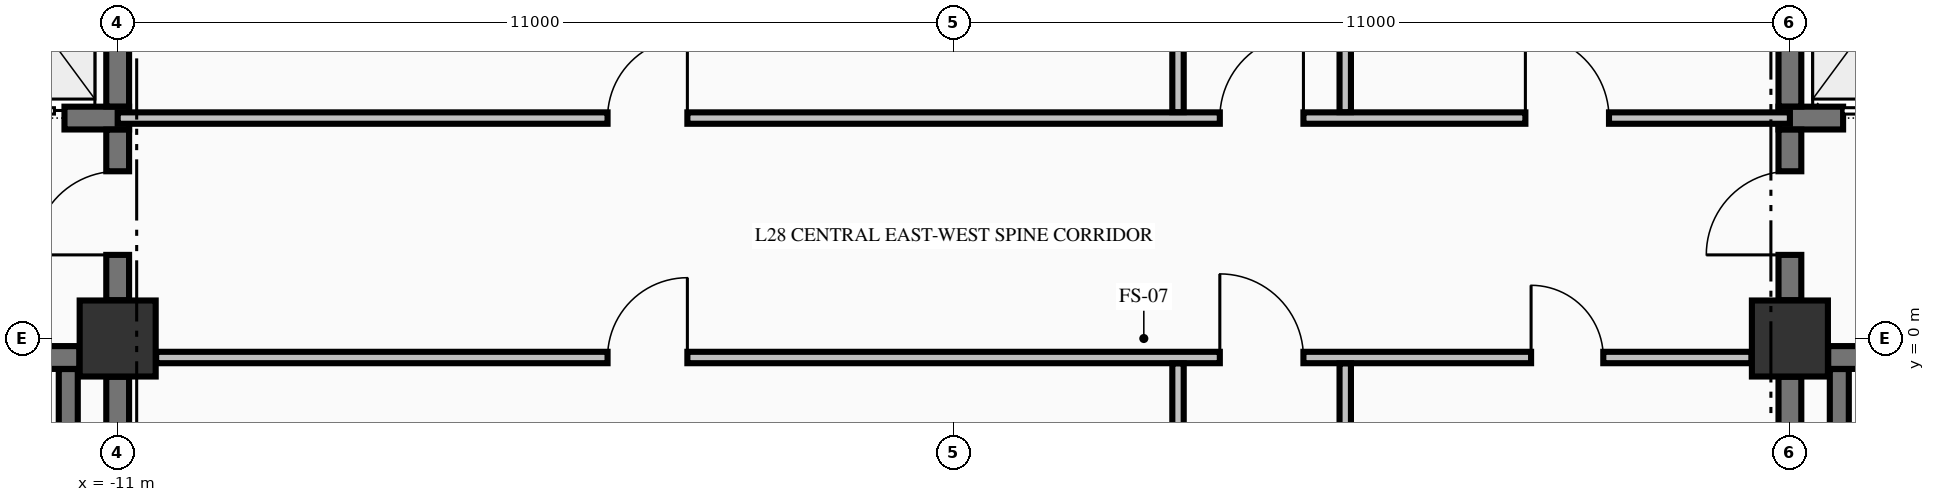
"""IFC4 building model, lengths in metres.
Left out: names, types, materials, properties, quantities, classifications, styles, units other than length and angle.
Written with IfcOpenShell. Run it as: python <this file> out.ifc"""

import sys

from ifc_helpers import new_model, si_unit, direction, frame, frame_2d, origin, origin_2d, place, context, subcontext, project, spatial, rectangle, extrude, element, fill, save


model = new_model("IFC4")
c1 = context("Model", 3, precision=1e-05, world=origin(), true_north=direction((0.0, 1.0)))
c2 = subcontext(c1, "Body", "Model", "MODEL_VIEW")
j1 = project(units=[si_unit("LENGTHUNIT", "METRE"), si_unit("PLANEANGLEUNIT", "RADIAN")], contexts=[c1])
p1 = place(None, origin())
s1 = spatial("IfcSite", under=j1, at=p1, CompositionType="ELEMENT")
p2 = place(p1, origin())
s2 = spatial("IfcBuilding", under=s1, at=p2, CompositionType="ELEMENT")
p3 = place(p2, frame((0.0, 0.0, 112.78)))
s3 = spatial("IfcBuildingStorey", under=s2, at=p3, CompositionType="ELEMENT", Elevation=112.78)
for number, where, z_axis, x_axis in (
    (1, (-11.0, 0.0, -0.25), (0.0, 0.0, 1.0), (1.0, 0.0, 0.0)),
    (2, (11.0, 0.0, -0.25), (0.0, 0.0, 1.0), (1.0, 0.0, 0.0)),
):
    element("IfcColumn", number, at=place(p3, frame(where, z_axis=z_axis, x_axis=x_axis)), inside=s3, PredefinedType="COLUMN", context=c2, shape_type="SweptSolid", body=[
        extrude(rectangle(XDim=1.0, YDim=1.0, at=origin_2d()), origin(), (0.0, 0.0, 1.0), 3.395),
    ])
p4 = place(p3, frame((-19.496, -0.25, 0.0), z_axis=(0.0, 0.0, 1.0), x_axis=(1.0, 0.0, 0.0)))
e3 = element("IfcWall", 3, at=p4, inside=s3, PredefinedType="SHEAR", context=c2, shape_type="SweptSolid", body=[
    extrude(rectangle(XDim=7.992, YDim=0.3, at=frame_2d((3.996, 0.0))), origin(), (0.0, 0.0, 1.0), 3.145),
])
p5 = place(p4, frame((5.796, 0.0, 0.0)))
e4 = element("IfcOpeningElement", 4, at=p5, cuts=e3, PredefinedType="OPENING", context=c2, shape_type="SweptSolid", body=[
    extrude(rectangle(XDim=1.1, YDim=2.15, at=frame_2d((0.55, 1.075))), frame((0.0, 0.16, 0.0), z_axis=(0.0, -1.0, 0.0), x_axis=(1.0, 0.0, 0.0)), (0.0, 0.0, 1.0), 0.32),
])
p6 = place(p3, frame((11.504, -0.25, 0.0), z_axis=(0.0, 0.0, 1.0), x_axis=(1.0, 0.0, 0.0)))
e5 = element("IfcWall", 5, at=p6, inside=s3, PredefinedType="SHEAR", context=c2, shape_type="SweptSolid", body=[
    extrude(rectangle(XDim=3.371, YDim=0.3, at=frame_2d((1.686, 0.0))), origin(), (0.0, 0.0, 1.0), 3.145),
])
p7 = place(p6, frame((1.096, 0.0, 0.0)))
e6 = element("IfcOpeningElement", 6, at=p7, cuts=e5, PredefinedType="OPENING", context=c2, shape_type="SweptSolid", body=[
    extrude(rectangle(XDim=1.1, YDim=2.15, at=frame_2d((0.55, 1.075))), frame((0.0, 0.16, 0.0), z_axis=(0.0, -1.0, 0.0), x_axis=(1.0, 0.0, 0.0)), (0.0, 0.0, 1.0), 0.32),
])
p8 = place(p3, frame((-14.875, 2.9, 0.0), z_axis=(0.0, 0.0, 1.0), x_axis=(1.0, 0.0, 0.0)))
e7 = element("IfcWall", 7, at=p8, inside=s3, PredefinedType="SHEAR", context=c2, shape_type="SweptSolid", body=[
    extrude(rectangle(XDim=4.025, YDim=0.3, at=frame_2d((2.012, 0.0))), origin(), (0.0, 0.0, 1.0), 3.145),
])
p9 = place(p8, frame((2.075, 0.0, 0.0)))
e8 = element("IfcOpeningElement", 8, at=p9, cuts=e7, PredefinedType="OPENING", context=c2, shape_type="SweptSolid", body=[
    extrude(rectangle(XDim=1.1, YDim=2.2, at=frame_2d((0.55, 1.1))), frame((0.0, 0.16, 0.0), z_axis=(0.0, -1.0, 0.0), x_axis=(1.0, 0.0, 0.0)), (0.0, 0.0, 1.0), 0.32),
])
p10 = place(p3, frame((10.85, 2.9, 0.0), z_axis=(0.0, 0.0, 1.0), x_axis=(1.0, 0.0, 0.0)))
e9 = element("IfcWall", 9, at=p10, inside=s3, PredefinedType="SHEAR", context=c2, shape_type="SweptSolid", body=[
    extrude(rectangle(XDim=4.025, YDim=0.3, at=frame_2d((2.012, 0.0))), origin(), (0.0, 0.0, 1.0), 3.145),
])
p11 = place(p10, frame((0.85, 0.0, 0.0)))
e10 = element("IfcOpeningElement", 10, at=p11, cuts=e9, PredefinedType="OPENING", context=c2, shape_type="SweptSolid", body=[
    extrude(rectangle(XDim=1.1, YDim=2.2, at=frame_2d((0.55, 1.1))), frame((0.0, 0.16, 0.0), z_axis=(0.0, -1.0, 0.0), x_axis=(1.0, 0.0, 0.0)), (0.0, 0.0, 1.0), 0.32),
])
p12 = place(p3, frame((-10.494, -0.25, 0.0), z_axis=(0.0, 0.0, 1.0), x_axis=(1.0, 0.0, 0.0)))
e11 = element("IfcWall", 11, at=p12, inside=s3, PredefinedType="PARTITIONING", context=c2, shape_type="SweptSolid", body=[
    extrude(rectangle(XDim=20.988, YDim=0.15, at=frame_2d((10.494, 0.0))), origin(), (0.0, 0.0, 1.0), 3.145),
])
p13 = place(p12, frame((13.994, 0.0, 0.0)))
e12 = element("IfcOpeningElement", 12, at=p13, cuts=e11, PredefinedType="OPENING", context=c2, shape_type="SweptSolid", body=[
    extrude(rectangle(XDim=1.1, YDim=2.15, at=frame_2d((0.55, 1.075))), frame((0.0, 0.085, 0.0), z_axis=(0.0, -1.0, 0.0), x_axis=(1.0, 0.0, 0.0)), (0.0, 0.0, 1.0), 0.17),
])
p14 = place(p12, frame((5.939, 0.0, 0.0)))
e13 = element("IfcOpeningElement", 13, at=p14, cuts=e11, PredefinedType="OPENING", context=c2, shape_type="SweptSolid", body=[
    extrude(rectangle(XDim=1.05, YDim=2.15, at=frame_2d((0.525, 1.075))), frame((0.0, 0.085, 0.0), z_axis=(0.0, -1.0, 0.0), x_axis=(1.0, 0.0, 0.0)), (0.0, 0.0, 1.0), 0.17),
])
p15 = place(p12, frame((18.089, 0.0, 0.0)))
e14 = element("IfcOpeningElement", 14, at=p15, cuts=e11, PredefinedType="OPENING", context=c2, shape_type="SweptSolid", body=[
    extrude(rectangle(XDim=0.95, YDim=2.15, at=frame_2d((0.475, 1.075))), frame((0.0, 0.085, 0.0), z_axis=(0.0, -1.0, 0.0), x_axis=(1.0, 0.0, 0.0)), (0.0, 0.0, 1.0), 0.17),
])
p16 = place(p3, frame((-11.0, 2.9, 0.0), z_axis=(0.0, 0.0, 1.0), x_axis=(1.0, 0.0, 0.0)))
e15 = element("IfcWall", 15, at=p16, inside=s3, PredefinedType="PARTITIONING", context=c2, shape_type="SweptSolid", body=[
    extrude(rectangle(XDim=22.0, YDim=0.15, at=frame_2d((11.0, 0.0))), origin(), (0.0, 0.0, 1.0), 3.145),
])
p17 = place(p16, frame((14.5, 0.0, 0.0)))
e16 = element("IfcOpeningElement", 16, at=p17, cuts=e15, PredefinedType="OPENING", context=c2, shape_type="SweptSolid", body=[
    extrude(rectangle(XDim=1.1, YDim=2.15, at=frame_2d((0.55, 1.075))), frame((0.0, 0.085, 0.0), z_axis=(0.0, -1.0, 0.0), x_axis=(1.0, 0.0, 0.0)), (0.0, 0.0, 1.0), 0.17),
])
p18 = place(p16, frame((6.445, 0.0, 0.0)))
e17 = element("IfcOpeningElement", 17, at=p18, cuts=e15, PredefinedType="OPENING", context=c2, shape_type="SweptSolid", body=[
    extrude(rectangle(XDim=1.05, YDim=2.15, at=frame_2d((0.525, 1.075))), frame((0.0, 0.085, 0.0), z_axis=(0.0, -1.0, 0.0), x_axis=(1.0, 0.0, 0.0)), (0.0, 0.0, 1.0), 0.17),
])
p19 = place(p16, frame((18.52, 0.0, 0.0)))
e18 = element("IfcOpeningElement", 18, at=p19, cuts=e15, PredefinedType="OPENING", context=c2, shape_type="SweptSolid", body=[
    extrude(rectangle(XDim=1.1, YDim=2.15, at=frame_2d((0.55, 1.075))), frame((0.0, 0.085, 0.0), z_axis=(0.0, -1.0, 0.0), x_axis=(1.0, 0.0, 0.0)), (0.0, 0.0, 1.0), 0.17),
])
p20 = place(p3, frame((-11.65, -9.798, 0.0), z_axis=(0.0, 0.0, 1.0), x_axis=(0.0, 1.0, 0.0)))
e19 = element("IfcWall", 19, at=p20, inside=s3, PredefinedType="SOLIDWALL", context=c2, shape_type="SweptSolid", body=[
    extrude(rectangle(XDim=9.396, YDim=0.25, at=frame_2d((4.698, 0.0))), origin(), (0.0, 0.0, 1.0), 3.145),
])
p21 = place(p3, frame((-11.0, -9.446, 0.0), z_axis=(0.0, 0.0, 1.0), x_axis=(0.0, 1.0, 0.0)))
e20 = element("IfcWall", 20, at=p21, inside=s3, PredefinedType="SHEAR", context=c2, shape_type="SweptSolid", body=[
    extrude(rectangle(XDim=8.942, YDim=0.3, at=frame_2d((4.471, 0.0))), origin(), (0.0, 0.0, 1.0), 3.145),
])
p22 = place(p3, frame((-11.0, 0.504, 0.0), z_axis=(0.0, 0.0, 1.0), x_axis=(0.0, 1.0, 0.0)))
e21 = element("IfcWall", 21, at=p22, inside=s3, PredefinedType="SHEAR", context=c2, shape_type="SweptSolid", body=[
    extrude(rectangle(XDim=2.244, YDim=0.3, at=frame_2d((1.122, 0.0))), origin(), (0.0, 0.0, 1.0), 3.145),
])
p23 = place(p22, frame((0.596, 0.0, 0.0)))
e22 = element("IfcOpeningElement", 22, at=p23, cuts=e21, PredefinedType="OPENING", context=c2, shape_type="SweptSolid", body=[
    extrude(rectangle(XDim=1.1, YDim=2.15, at=frame_2d((0.55, 1.075))), frame((0.0, 0.16, 0.0), z_axis=(0.0, -1.0, 0.0), x_axis=(1.0, 0.0, 0.0)), (0.0, 0.0, 1.0), 0.32),
])
p24 = place(p3, frame((-11.0, 3.052, 0.0), z_axis=(0.0, 0.0, 1.0), x_axis=(0.0, 1.0, 0.0)))
e23 = element("IfcWall", 23, at=p24, inside=s3, PredefinedType="SHEAR", context=c2, shape_type="SweptSolid", body=[
    extrude(rectangle(XDim=2.496, YDim=0.3, at=frame_2d((1.248, 0.0))), origin(), (0.0, 0.0, 1.0), 3.145),
])
p25 = place(p3, frame((11.0, -9.446, 0.0), z_axis=(0.0, 0.0, 1.0), x_axis=(0.0, 1.0, 0.0)))
e24 = element("IfcWall", 24, at=p25, inside=s3, PredefinedType="SHEAR", context=c2, shape_type="SweptSolid", body=[
    extrude(rectangle(XDim=8.942, YDim=0.3, at=frame_2d((4.471, 0.0))), origin(), (0.0, 0.0, 1.0), 3.145),
])
p26 = place(p3, frame((11.0, 0.504, 0.0), z_axis=(0.0, 0.0, 1.0), x_axis=(0.0, 1.0, 0.0)))
e25 = element("IfcWall", 25, at=p26, inside=s3, PredefinedType="SHEAR", context=c2, shape_type="SweptSolid", body=[
    extrude(rectangle(XDim=2.244, YDim=0.3, at=frame_2d((1.122, 0.0))), origin(), (0.0, 0.0, 1.0), 3.145),
])
p27 = place(p26, frame((0.596, 0.0, 0.0)))
e26 = element("IfcOpeningElement", 26, at=p27, cuts=e25, PredefinedType="OPENING", context=c2, shape_type="SweptSolid", body=[
    extrude(rectangle(XDim=1.1, YDim=2.15, at=frame_2d((0.55, 1.075))), frame((0.0, 0.16, 0.0), z_axis=(0.0, -1.0, 0.0), x_axis=(1.0, 0.0, 0.0)), (0.0, 0.0, 1.0), 0.32),
])
p28 = place(p3, frame((11.0, 3.052, 0.0), z_axis=(0.0, 0.0, 1.0), x_axis=(0.0, 1.0, 0.0)))
e27 = element("IfcWall", 27, at=p28, inside=s3, PredefinedType="SHEAR", context=c2, shape_type="SweptSolid", body=[
    extrude(rectangle(XDim=2.496, YDim=0.3, at=frame_2d((1.248, 0.0))), origin(), (0.0, 0.0, 1.0), 3.145),
])
p29 = place(p3, frame((11.65, -9.798, 0.0), z_axis=(0.0, 0.0, 1.0), x_axis=(0.0, 1.0, 0.0)))
e28 = element("IfcWall", 28, at=p29, inside=s3, PredefinedType="SOLIDWALL", context=c2, shape_type="SweptSolid", body=[
    extrude(rectangle(XDim=9.396, YDim=0.25, at=frame_2d((4.698, 0.0))), origin(), (0.0, 0.0, 1.0), 3.145),
])
p30 = place(p3, frame((2.95, -9.872, 0.0), z_axis=(0.0, 0.0, 1.0), x_axis=(0.0, 1.0, 0.0)))
e29 = element("IfcWall", 29, at=p30, inside=s3, PredefinedType="PARTITIONING", context=c2, shape_type="SweptSolid", body=[
    extrude(rectangle(XDim=9.544, YDim=0.15, at=frame_2d((4.772, 0.0))), origin(), (0.0, 0.0, 1.0), 3.145),
])
p31 = place(p3, frame((2.95, 2.978, 0.0), z_axis=(0.0, 0.0, 1.0), x_axis=(0.0, 1.0, 0.0)))
e30 = element("IfcWall", 30, at=p31, inside=s3, PredefinedType="PARTITIONING", context=c2, shape_type="SweptSolid", body=[
    extrude(rectangle(XDim=7.444, YDim=0.15, at=frame_2d((3.722, 0.0))), origin(), (0.0, 0.0, 1.0), 3.145),
])
p32 = place(p3, frame((5.15, -4.747, 0.0), z_axis=(0.0, 0.0, 1.0), x_axis=(0.0, 1.0, 0.0)))
e31 = element("IfcWall", 31, at=p32, inside=s3, PredefinedType="PARTITIONING", context=c2, shape_type="SweptSolid", body=[
    extrude(rectangle(XDim=4.419, YDim=0.15, at=frame_2d((2.209, 0.0))), origin(), (0.0, 0.0, 1.0), 3.145),
])
p33 = place(p3, frame((5.15, 2.978, 0.0), z_axis=(0.0, 0.0, 1.0), x_axis=(0.0, 1.0, 0.0)))
e32 = element("IfcWall", 32, at=p33, inside=s3, PredefinedType="PARTITIONING", context=c2, shape_type="SweptSolid", body=[
    extrude(rectangle(XDim=7.444, YDim=0.15, at=frame_2d((3.722, 0.0))), origin(), (0.0, 0.0, 1.0), 3.145),
])
p34 = place(p23, origin())
e33 = element("IfcDoor", 33, at=p34, inside=s3, OperationType="SINGLE_SWING_LEFT", PredefinedType="DOOR", context=c2, shape_type="SweptSolid", body=[
    extrude(rectangle(XDim=1.1, YDim=2.15, at=frame_2d((0.55, 1.075))), frame((0.0, 0.025, 0.0), z_axis=(0.0, -1.0, 0.0), x_axis=(1.0, 0.0, 0.0)), (0.0, 0.0, 1.0), 0.05),
])
fill(e22, e33)
p35 = place(p9, origin())
e34 = element("IfcDoor", 34, at=p35, inside=s3, OperationType="SLIDING_TO_LEFT", PredefinedType="DOOR", context=c2, shape_type="SweptSolid", body=[
    extrude(rectangle(XDim=1.1, YDim=2.2, at=frame_2d((0.55, 1.1))), frame((0.0, 0.025, 0.0), z_axis=(0.0, -1.0, 0.0), x_axis=(1.0, 0.0, 0.0)), (0.0, 0.0, 1.0), 0.05),
])
fill(e8, e34)
p36 = place(p27, origin())
e35 = element("IfcDoor", 35, at=p36, inside=s3, OperationType="SINGLE_SWING_LEFT", PredefinedType="DOOR", context=c2, shape_type="SweptSolid", body=[
    extrude(rectangle(XDim=1.1, YDim=2.15, at=frame_2d((0.55, 1.075))), frame((0.0, 0.025, 0.0), z_axis=(0.0, -1.0, 0.0), x_axis=(1.0, 0.0, 0.0)), (0.0, 0.0, 1.0), 0.05),
])
fill(e26, e35)
p37 = place(p11, origin())
e36 = element("IfcDoor", 36, at=p37, inside=s3, OperationType="SLIDING_TO_RIGHT", PredefinedType="DOOR", context=c2, shape_type="SweptSolid", body=[
    extrude(rectangle(XDim=1.1, YDim=2.2, at=frame_2d((0.55, 1.1))), frame((0.0, 0.025, 0.0), z_axis=(0.0, -1.0, 0.0), x_axis=(1.0, 0.0, 0.0)), (0.0, 0.0, 1.0), 0.05),
])
fill(e10, e36)
p38 = place(p17, origin())
e37 = element("IfcDoor", 37, at=p38, inside=s3, OperationType="SINGLE_SWING_RIGHT", PredefinedType="DOOR", context=c2, shape_type="SweptSolid", body=[
    extrude(rectangle(XDim=1.1, YDim=2.15, at=frame_2d((0.55, 1.075))), frame((0.0, 0.025, 0.0), z_axis=(0.0, -1.0, 0.0), x_axis=(1.0, 0.0, 0.0)), (0.0, 0.0, 1.0), 0.05),
])
fill(e16, e37)
p39 = place(p13, origin())
e38 = element("IfcDoor", 38, at=p39, inside=s3, OperationType="SINGLE_SWING_LEFT", PredefinedType="DOOR", context=c2, shape_type="SweptSolid", body=[
    extrude(rectangle(XDim=1.1, YDim=2.15, at=frame_2d((0.55, 1.075))), frame((0.0, 0.025, 0.0), z_axis=(0.0, -1.0, 0.0), x_axis=(1.0, 0.0, 0.0)), (0.0, 0.0, 1.0), 0.05),
])
fill(e12, e38)
p40 = place(p18, origin())
e39 = element("IfcDoor", 39, at=p40, inside=s3, OperationType="SINGLE_SWING_RIGHT", PredefinedType="DOOR", context=c2, shape_type="SweptSolid", body=[
    extrude(rectangle(XDim=1.05, YDim=2.15, at=frame_2d((0.525, 1.075))), frame((0.0, 0.025, 0.0), z_axis=(0.0, -1.0, 0.0), x_axis=(1.0, 0.0, 0.0)), (0.0, 0.0, 1.0), 0.05),
])
fill(e17, e39)
p41 = place(p19, origin())
e40 = element("IfcDoor", 40, at=p41, inside=s3, OperationType="SINGLE_SWING_LEFT", PredefinedType="DOOR", context=c2, shape_type="SweptSolid", body=[
    extrude(rectangle(XDim=1.1, YDim=2.15, at=frame_2d((0.55, 1.075))), frame((0.0, 0.025, 0.0), z_axis=(0.0, -1.0, 0.0), x_axis=(1.0, 0.0, 0.0)), (0.0, 0.0, 1.0), 0.05),
])
fill(e18, e40)
p42 = place(p14, origin())
e41 = element("IfcDoor", 41, at=p42, inside=s3, OperationType="SINGLE_SWING_RIGHT", PredefinedType="DOOR", context=c2, shape_type="SweptSolid", body=[
    extrude(rectangle(XDim=1.05, YDim=2.15, at=frame_2d((0.525, 1.075))), frame((0.0, 0.025, 0.0), z_axis=(0.0, -1.0, 0.0), x_axis=(1.0, 0.0, 0.0)), (0.0, 0.0, 1.0), 0.05),
])
fill(e13, e41)
p43 = place(p15, origin())
e42 = element("IfcDoor", 42, at=p43, inside=s3, OperationType="SINGLE_SWING_LEFT", PredefinedType="DOOR", context=c2, shape_type="SweptSolid", body=[
    extrude(rectangle(XDim=0.95, YDim=2.15, at=frame_2d((0.475, 1.075))), frame((0.0, 0.025, 0.0), z_axis=(0.0, -1.0, 0.0), x_axis=(1.0, 0.0, 0.0)), (0.0, 0.0, 1.0), 0.05),
])
fill(e14, e42)
save(model, sys.argv[1])
